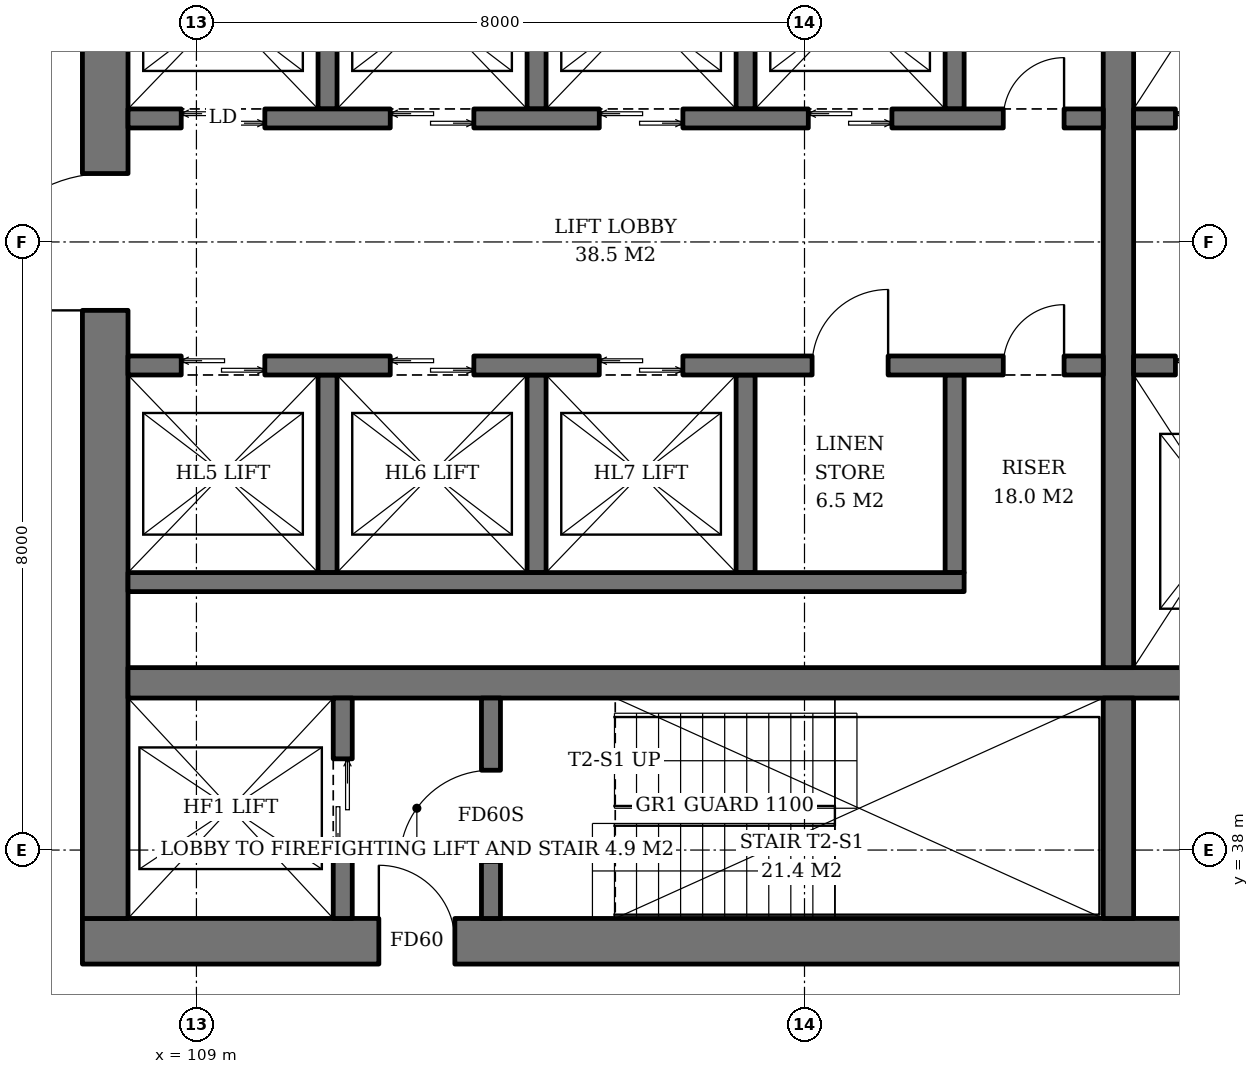
"""IFC4 building model, lengths in metres.
Left out: names, types, materials, properties, quantities, classifications, styles, units other than length and angle.
Written with IfcOpenShell. Run it as: python <this file> out.ifc"""

import sys

from ifc_helpers import new_model, si_unit, direction, frame, frame_2d, origin, place, context, subcontext, project, spatial, rectangle, extrude, element, fill, save


model = new_model("IFC4")
c1 = context("Model", 3, precision=1e-05, world=origin(), true_north=direction((0.0, 1.0)))
c2 = subcontext(c1, "Body", "Model", "MODEL_VIEW")
j1 = project(units=[si_unit("LENGTHUNIT", "METRE"), si_unit("PLANEANGLEUNIT", "RADIAN")], contexts=[c1])
p1 = place(None, origin())
s1 = spatial("IfcSite", under=j1, at=p1, CompositionType="ELEMENT")
p2 = place(p1, origin())
s2 = spatial("IfcBuilding", under=s1, at=p2, CompositionType="ELEMENT")
p3 = place(p2, frame((0.0, 0.0, 24.8)))
s3 = spatial("IfcBuildingStorey", under=s2, at=p3, CompositionType="ELEMENT", Elevation=24.8)
p4 = place(p3, frame((107.5, 36.8, 0.0), z_axis=(0.0, 0.0, 1.0), x_axis=(1.0, 0.0, 0.0)))
e1 = element("IfcWall", 1, at=p4, inside=s3, PredefinedType="SHEAR", context=c2, shape_type="SweptSolid", body=[
    extrude(rectangle(XDim=19.0, YDim=0.6, at=frame_2d((9.5, 0.0))), origin(), (0.0, 0.0, 1.0), 3.8),
])
p5 = place(p4, frame((3.9, 0.0, 0.0)))
e2 = element("IfcOpeningElement", 2, at=p5, cuts=e1, PredefinedType="OPENING", context=c2, shape_type="SweptSolid", body=[
    extrude(rectangle(XDim=1.0, YDim=2.1, at=frame_2d((0.5, 1.05))), frame((0.0, 0.31, 0.0), z_axis=(0.0, -1.0, 0.0), x_axis=(1.0, 0.0, 0.0)), (0.0, 0.0, 1.0), 0.62),
])
p6 = place(p4, frame((15.615, 0.0, 0.0)))
e3 = element("IfcOpeningElement", 3, at=p6, cuts=e1, PredefinedType="OPENING", context=c2, shape_type="SweptSolid", body=[
    extrude(rectangle(XDim=1.0, YDim=2.1, at=frame_2d((0.5, 1.05))), frame((0.0, 0.31, 0.0), z_axis=(0.0, -1.0, 0.0), x_axis=(1.0, 0.0, 0.0)), (0.0, 0.0, 1.0), 0.62),
])
p7 = place(p3, frame((107.8, 37.1, 0.0), z_axis=(0.0, 0.0, 1.0), x_axis=(0.0, 1.0, 0.0)))
e4 = element("IfcWall", 4, at=p7, inside=s3, PredefinedType="SHEAR", context=c2, shape_type="SweptSolid", body=[
    extrude(rectangle(XDim=17.8, YDim=0.6, at=frame_2d((8.9, 0.0))), origin(), (0.0, 0.0, 1.0), 3.8),
])
p8 = place(p7, frame((8.0, 0.0, 0.0)))
e5 = element("IfcOpeningElement", 5, at=p8, cuts=e4, PredefinedType="OPENING", context=c2, shape_type="SweptSolid", body=[
    extrude(rectangle(XDim=1.8, YDim=2.4, at=frame_2d((0.9, 1.2))), frame((0.0, 0.31, 0.0), z_axis=(0.0, -1.0, 0.0), x_axis=(1.0, 0.0, 0.0)), (0.0, 0.0, 1.0), 0.62),
])
p9 = place(p3, frame((108.1, 40.2, 0.0), z_axis=(0.0, 0.0, 1.0), x_axis=(1.0, 0.0, 0.0)))
e6 = element("IfcWall", 6, at=p9, inside=s3, PredefinedType="SHEAR", context=c2, shape_type="SweptSolid", body=[
    extrude(rectangle(XDim=17.8, YDim=0.4, at=frame_2d((8.9, 0.0))), origin(), (0.0, 0.0, 1.0), 3.8),
])
p10 = place(p3, frame((121.13, 37.1, 0.0), z_axis=(0.0, 0.0, 1.0), x_axis=(0.0, 1.0, 0.0)))
e7 = element("IfcWall", 7, at=p10, inside=s3, PredefinedType="SHEAR", context=c2, shape_type="SweptSolid", body=[
    extrude(rectangle(XDim=2.9, YDim=0.4, at=frame_2d((1.45, 0.0))), origin(), (0.0, 0.0, 1.0), 3.8),
])
p11 = place(p3, frame((121.13, 40.4, 0.0), z_axis=(0.0, 0.0, 1.0), x_axis=(0.0, 1.0, 0.0)))
e8 = element("IfcWall", 8, at=p11, inside=s3, PredefinedType="SHEAR", context=c2, shape_type="SweptSolid", body=[
    extrude(rectangle(XDim=11.2, YDim=0.4, at=frame_2d((5.6, 0.0))), origin(), (0.0, 0.0, 1.0), 3.8),
])
p12 = place(p3, frame((110.925, 37.1, 0.0), z_axis=(0.0, 0.0, 1.0), x_axis=(0.0, 1.0, 0.0)))
e9 = element("IfcWall", 9, at=p12, inside=s3, PredefinedType="SHEAR", context=c2, shape_type="SweptSolid", body=[
    extrude(rectangle(XDim=2.9, YDim=0.25, at=frame_2d((1.45, 0.0))), origin(), (0.0, 0.0, 1.0), 3.8),
])
p13 = place(p12, frame((0.8, 0.0, 0.0)))
e10 = element("IfcOpeningElement", 10, at=p13, cuts=e9, PredefinedType="OPENING", context=c2, shape_type="SweptSolid", body=[
    extrude(rectangle(XDim=1.3, YDim=2.2, at=frame_2d((0.65, 1.1))), frame((0.0, 0.135, 0.0), z_axis=(0.0, -1.0, 0.0), x_axis=(1.0, 0.0, 0.0)), (0.0, 0.0, 1.0), 0.27),
])
p14 = place(p3, frame((112.875, 37.1, 0.0), z_axis=(0.0, 0.0, 1.0), x_axis=(0.0, 1.0, 0.0)))
e11 = element("IfcWall", 11, at=p14, inside=s3, PredefinedType="SHEAR", context=c2, shape_type="SweptSolid", body=[
    extrude(rectangle(XDim=2.9, YDim=0.25, at=frame_2d((1.45, 0.0))), origin(), (0.0, 0.0, 1.0), 3.8),
])
p15 = place(p14, frame((0.75, 0.0, 0.0)))
e12 = element("IfcOpeningElement", 12, at=p15, cuts=e11, PredefinedType="OPENING", context=c2, shape_type="SweptSolid", body=[
    extrude(rectangle(XDim=1.2, YDim=2.1, at=frame_2d((0.6, 1.05))), frame((0.0, 0.135, 0.0), z_axis=(0.0, -1.0, 0.0), x_axis=(1.0, 0.0, 0.0)), (0.0, 0.0, 1.0), 0.27),
])
for number, where, z_axis, x_axis in (
    (13, (110.725, 47.75, 0.0), (0.0, 0.0, 1.0), (0.0, 1.0, 0.0)),
    (14, (113.475, 47.75, 0.0), (0.0, 0.0, 1.0), (0.0, 1.0, 0.0)),
    (15, (116.225, 47.75, 0.0), (0.0, 0.0, 1.0), (0.0, 1.0, 0.0)),
    (16, (118.975, 47.75, 0.0), (0.0, 0.0, 1.0), (0.0, 1.0, 0.0)),
):
    element("IfcWall", number, at=place(p3, frame(where, z_axis=z_axis, x_axis=x_axis)), inside=s3, PredefinedType="SHEAR", context=c2, shape_type="SweptSolid", body=[
        extrude(rectangle(XDim=2.6, YDim=0.25, at=frame_2d((1.3, 0.0))), origin(), (0.0, 0.0, 1.0), 3.8),
    ])
p16 = place(p3, frame((108.1, 47.625, 0.0), z_axis=(0.0, 0.0, 1.0), x_axis=(1.0, 0.0, 0.0)))
e17 = element("IfcWall", 17, at=p16, inside=s3, PredefinedType="SHEAR", context=c2, shape_type="SweptSolid", body=[
    extrude(rectangle(XDim=12.83, YDim=0.25, at=frame_2d((6.415, 0.0))), origin(), (0.0, 0.0, 1.0), 3.8),
])
p17 = place(p16, frame((0.7, 0.0, 0.0)))
e18 = element("IfcOpeningElement", 18, at=p17, cuts=e17, PredefinedType="OPENING", context=c2, shape_type="SweptSolid", body=[
    extrude(rectangle(XDim=1.1, YDim=2.2, at=frame_2d((0.55, 1.1))), frame((0.0, 0.135, 0.0), z_axis=(0.0, -1.0, 0.0), x_axis=(1.0, 0.0, 0.0)), (0.0, 0.0, 1.0), 0.27),
])
p18 = place(p16, frame((3.45, 0.0, 0.0)))
e19 = element("IfcOpeningElement", 19, at=p18, cuts=e17, PredefinedType="OPENING", context=c2, shape_type="SweptSolid", body=[
    extrude(rectangle(XDim=1.1, YDim=2.2, at=frame_2d((0.55, 1.1))), frame((0.0, 0.135, 0.0), z_axis=(0.0, -1.0, 0.0), x_axis=(1.0, 0.0, 0.0)), (0.0, 0.0, 1.0), 0.27),
])
p19 = place(p16, frame((6.2, 0.0, 0.0)))
e20 = element("IfcOpeningElement", 20, at=p19, cuts=e17, PredefinedType="OPENING", context=c2, shape_type="SweptSolid", body=[
    extrude(rectangle(XDim=1.1, YDim=2.2, at=frame_2d((0.55, 1.1))), frame((0.0, 0.135, 0.0), z_axis=(0.0, -1.0, 0.0), x_axis=(1.0, 0.0, 0.0)), (0.0, 0.0, 1.0), 0.27),
])
p20 = place(p16, frame((8.95, 0.0, 0.0)))
e21 = element("IfcOpeningElement", 21, at=p20, cuts=e17, PredefinedType="OPENING", context=c2, shape_type="SweptSolid", body=[
    extrude(rectangle(XDim=1.1, YDim=2.2, at=frame_2d((0.55, 1.1))), frame((0.0, 0.135, 0.0), z_axis=(0.0, -1.0, 0.0), x_axis=(1.0, 0.0, 0.0)), (0.0, 0.0, 1.0), 0.27),
])
p21 = place(p16, frame((11.515, 0.0, 0.0)))
e22 = element("IfcOpeningElement", 22, at=p21, cuts=e17, PredefinedType="OPENING", context=c2, shape_type="SweptSolid", body=[
    extrude(rectangle(XDim=0.8, YDim=2.0, at=frame_2d((0.4, 1.0))), frame((0.0, 0.135, 0.0), z_axis=(0.0, -1.0, 0.0), x_axis=(1.0, 0.0, 0.0)), (0.0, 0.0, 1.0), 0.27),
])
for number, where, z_axis, x_axis in (
    (23, (110.725, 44.25, 0.0), (0.0, 0.0, 1.0), (0.0, -1.0, 0.0)),
    (24, (113.475, 44.25, 0.0), (0.0, 0.0, 1.0), (0.0, -1.0, 0.0)),
    (25, (116.225, 44.25, 0.0), (0.0, 0.0, 1.0), (0.0, -1.0, 0.0)),
    (26, (118.975, 44.25, 0.0), (0.0, 0.0, 1.0), (0.0, -1.0, 0.0)),
):
    element("IfcWall", number, at=place(p3, frame(where, z_axis=z_axis, x_axis=x_axis)), inside=s3, PredefinedType="SHEAR", context=c2, shape_type="SweptSolid", body=[
        extrude(rectangle(XDim=2.6, YDim=0.25, at=frame_2d((1.3, 0.0))), origin(), (0.0, 0.0, 1.0), 3.8),
    ])
p22 = place(p3, frame((108.1, 41.525, 0.0), z_axis=(0.0, 0.0, 1.0), x_axis=(1.0, 0.0, 0.0)))
e27 = element("IfcWall", 27, at=p22, inside=s3, PredefinedType="SHEAR", context=c2, shape_type="SweptSolid", body=[
    extrude(rectangle(XDim=11.0, YDim=0.25, at=frame_2d((5.5, 0.0))), origin(), (0.0, 0.0, 1.0), 3.8),
])
p23 = place(p3, frame((108.1, 44.375, 0.0), z_axis=(0.0, 0.0, 1.0), x_axis=(1.0, 0.0, 0.0)))
e28 = element("IfcWall", 28, at=p23, inside=s3, PredefinedType="SHEAR", context=c2, shape_type="SweptSolid", body=[
    extrude(rectangle(XDim=12.83, YDim=0.25, at=frame_2d((6.415, 0.0))), origin(), (0.0, 0.0, 1.0), 3.8),
])
p24 = place(p23, frame((0.7, 0.0, 0.0)))
e29 = element("IfcOpeningElement", 29, at=p24, cuts=e28, PredefinedType="OPENING", context=c2, shape_type="SweptSolid", body=[
    extrude(rectangle(XDim=1.1, YDim=2.2, at=frame_2d((0.55, 1.1))), frame((0.0, 0.135, 0.0), z_axis=(0.0, -1.0, 0.0), x_axis=(1.0, 0.0, 0.0)), (0.0, 0.0, 1.0), 0.27),
])
p25 = place(p23, frame((3.45, 0.0, 0.0)))
e30 = element("IfcOpeningElement", 30, at=p25, cuts=e28, PredefinedType="OPENING", context=c2, shape_type="SweptSolid", body=[
    extrude(rectangle(XDim=1.1, YDim=2.2, at=frame_2d((0.55, 1.1))), frame((0.0, 0.135, 0.0), z_axis=(0.0, -1.0, 0.0), x_axis=(1.0, 0.0, 0.0)), (0.0, 0.0, 1.0), 0.27),
])
p26 = place(p23, frame((6.2, 0.0, 0.0)))
e31 = element("IfcOpeningElement", 31, at=p26, cuts=e28, PredefinedType="OPENING", context=c2, shape_type="SweptSolid", body=[
    extrude(rectangle(XDim=1.1, YDim=2.2, at=frame_2d((0.55, 1.1))), frame((0.0, 0.135, 0.0), z_axis=(0.0, -1.0, 0.0), x_axis=(1.0, 0.0, 0.0)), (0.0, 0.0, 1.0), 0.27),
])
p27 = place(p23, frame((9.0, 0.0, 0.0)))
e32 = element("IfcOpeningElement", 32, at=p27, cuts=e28, PredefinedType="OPENING", context=c2, shape_type="SweptSolid", body=[
    extrude(rectangle(XDim=1.0, YDim=2.1, at=frame_2d((0.5, 1.05))), frame((0.0, 0.135, 0.0), z_axis=(0.0, -1.0, 0.0), x_axis=(1.0, 0.0, 0.0)), (0.0, 0.0, 1.0), 0.27),
])
p28 = place(p23, frame((11.515, 0.0, 0.0)))
e33 = element("IfcOpeningElement", 33, at=p28, cuts=e28, PredefinedType="OPENING", context=c2, shape_type="SweptSolid", body=[
    extrude(rectangle(XDim=0.8, YDim=2.0, at=frame_2d((0.4, 1.0))), frame((0.0, 0.135, 0.0), z_axis=(0.0, -1.0, 0.0), x_axis=(1.0, 0.0, 0.0)), (0.0, 0.0, 1.0), 0.27),
])
p29 = place(p3, frame((121.33, 47.625, 0.0), z_axis=(0.0, 0.0, 1.0), x_axis=(1.0, 0.0, 0.0)))
e34 = element("IfcWall", 34, at=p29, inside=s3, PredefinedType="SHEAR", context=c2, shape_type="SweptSolid", body=[
    extrude(rectangle(XDim=4.57, YDim=0.25, at=frame_2d((2.285, 0.0))), origin(), (0.0, 0.0, 1.0), 3.8),
])
p30 = place(p29, frame((0.55, 0.0, 0.0)))
e35 = element("IfcOpeningElement", 35, at=p30, cuts=e34, PredefinedType="OPENING", context=c2, shape_type="SweptSolid", body=[
    extrude(rectangle(XDim=1.4, YDim=2.4, at=frame_2d((0.7, 1.2))), frame((0.0, 0.135, 0.0), z_axis=(0.0, -1.0, 0.0), x_axis=(1.0, 0.0, 0.0)), (0.0, 0.0, 1.0), 0.27),
])
p31 = place(p29, frame((3.26, 0.0, 0.0)))
e36 = element("IfcOpeningElement", 36, at=p31, cuts=e34, PredefinedType="OPENING", context=c2, shape_type="SweptSolid", body=[
    extrude(rectangle(XDim=0.8, YDim=2.0, at=frame_2d((0.4, 1.0))), frame((0.0, 0.135, 0.0), z_axis=(0.0, -1.0, 0.0), x_axis=(1.0, 0.0, 0.0)), (0.0, 0.0, 1.0), 0.27),
])
p32 = place(p3, frame((121.33, 44.375, 0.0), z_axis=(0.0, 0.0, 1.0), x_axis=(1.0, 0.0, 0.0)))
e37 = element("IfcWall", 37, at=p32, inside=s3, PredefinedType="SHEAR", context=c2, shape_type="SweptSolid", body=[
    extrude(rectangle(XDim=4.57, YDim=0.25, at=frame_2d((2.285, 0.0))), origin(), (0.0, 0.0, 1.0), 3.8),
])
p33 = place(p32, frame((0.55, 0.0, 0.0)))
e38 = element("IfcOpeningElement", 38, at=p33, cuts=e37, PredefinedType="OPENING", context=c2, shape_type="SweptSolid", body=[
    extrude(rectangle(XDim=1.4, YDim=2.4, at=frame_2d((0.7, 1.2))), frame((0.0, 0.135, 0.0), z_axis=(0.0, -1.0, 0.0), x_axis=(1.0, 0.0, 0.0)), (0.0, 0.0, 1.0), 0.27),
])
p34 = place(p32, frame((3.26, 0.0, 0.0)))
e39 = element("IfcOpeningElement", 39, at=p34, cuts=e37, PredefinedType="OPENING", context=c2, shape_type="SweptSolid", body=[
    extrude(rectangle(XDim=0.8, YDim=2.0, at=frame_2d((0.4, 1.0))), frame((0.0, 0.135, 0.0), z_axis=(0.0, -1.0, 0.0), x_axis=(1.0, 0.0, 0.0)), (0.0, 0.0, 1.0), 0.27),
])
p35 = place(p13, origin())
e40 = element("IfcDoor", 40, at=p35, inside=s3, OperationType="DOUBLE_DOOR_SLIDING", PredefinedType="DOOR", context=c2, shape_type="SweptSolid", body=[
    extrude(rectangle(XDim=1.3, YDim=2.2, at=frame_2d((0.65, 1.1))), frame((0.0, 0.025, 0.0), z_axis=(0.0, -1.0, 0.0), x_axis=(1.0, 0.0, 0.0)), (0.0, 0.0, 1.0), 0.05),
])
fill(e10, e40)
p36 = place(p15, origin())
e41 = element("IfcDoor", 41, at=p36, inside=s3, OperationType="SINGLE_SWING_LEFT", PredefinedType="DOOR", context=c2, shape_type="SweptSolid", body=[
    extrude(rectangle(XDim=1.2, YDim=2.1, at=frame_2d((0.6, 1.05))), frame((0.0, 0.025, 0.0), z_axis=(0.0, -1.0, 0.0), x_axis=(1.0, 0.0, 0.0)), (0.0, 0.0, 1.0), 0.05),
])
fill(e12, e41)
p37 = place(p17, origin())
e42 = element("IfcDoor", 42, at=p37, inside=s3, OperationType="DOUBLE_DOOR_SLIDING", PredefinedType="DOOR", context=c2, shape_type="SweptSolid", body=[
    extrude(rectangle(XDim=1.1, YDim=2.2, at=frame_2d((0.55, 1.1))), frame((0.0, 0.025, 0.0), z_axis=(0.0, -1.0, 0.0), x_axis=(1.0, 0.0, 0.0)), (0.0, 0.0, 1.0), 0.05),
])
fill(e18, e42)
p38 = place(p18, origin())
e43 = element("IfcDoor", 43, at=p38, inside=s3, OperationType="DOUBLE_DOOR_SLIDING", PredefinedType="DOOR", context=c2, shape_type="SweptSolid", body=[
    extrude(rectangle(XDim=1.1, YDim=2.2, at=frame_2d((0.55, 1.1))), frame((0.0, 0.025, 0.0), z_axis=(0.0, -1.0, 0.0), x_axis=(1.0, 0.0, 0.0)), (0.0, 0.0, 1.0), 0.05),
])
fill(e19, e43)
p39 = place(p19, origin())
e44 = element("IfcDoor", 44, at=p39, inside=s3, OperationType="DOUBLE_DOOR_SLIDING", PredefinedType="DOOR", context=c2, shape_type="SweptSolid", body=[
    extrude(rectangle(XDim=1.1, YDim=2.2, at=frame_2d((0.55, 1.1))), frame((0.0, 0.025, 0.0), z_axis=(0.0, -1.0, 0.0), x_axis=(1.0, 0.0, 0.0)), (0.0, 0.0, 1.0), 0.05),
])
fill(e20, e44)
p40 = place(p20, origin())
e45 = element("IfcDoor", 45, at=p40, inside=s3, OperationType="DOUBLE_DOOR_SLIDING", PredefinedType="DOOR", context=c2, shape_type="SweptSolid", body=[
    extrude(rectangle(XDim=1.1, YDim=2.2, at=frame_2d((0.55, 1.1))), frame((0.0, 0.025, 0.0), z_axis=(0.0, -1.0, 0.0), x_axis=(1.0, 0.0, 0.0)), (0.0, 0.0, 1.0), 0.05),
])
fill(e21, e45)
p41 = place(p21, origin())
e46 = element("IfcDoor", 46, at=p41, inside=s3, OperationType="SINGLE_SWING_RIGHT", PredefinedType="DOOR", context=c2, shape_type="SweptSolid", body=[
    extrude(rectangle(XDim=0.8, YDim=2.0, at=frame_2d((0.4, 1.0))), frame((0.0, 0.025, 0.0), z_axis=(0.0, -1.0, 0.0), x_axis=(1.0, 0.0, 0.0)), (0.0, 0.0, 1.0), 0.05),
])
fill(e22, e46)
p42 = place(p24, origin())
e47 = element("IfcDoor", 47, at=p42, inside=s3, OperationType="DOUBLE_DOOR_SLIDING", PredefinedType="DOOR", context=c2, shape_type="SweptSolid", body=[
    extrude(rectangle(XDim=1.1, YDim=2.2, at=frame_2d((0.55, 1.1))), frame((0.0, 0.025, 0.0), z_axis=(0.0, -1.0, 0.0), x_axis=(1.0, 0.0, 0.0)), (0.0, 0.0, 1.0), 0.05),
])
fill(e29, e47)
p43 = place(p25, origin())
e48 = element("IfcDoor", 48, at=p43, inside=s3, OperationType="DOUBLE_DOOR_SLIDING", PredefinedType="DOOR", context=c2, shape_type="SweptSolid", body=[
    extrude(rectangle(XDim=1.1, YDim=2.2, at=frame_2d((0.55, 1.1))), frame((0.0, 0.025, 0.0), z_axis=(0.0, -1.0, 0.0), x_axis=(1.0, 0.0, 0.0)), (0.0, 0.0, 1.0), 0.05),
])
fill(e30, e48)
p44 = place(p26, origin())
e49 = element("IfcDoor", 49, at=p44, inside=s3, OperationType="DOUBLE_DOOR_SLIDING", PredefinedType="DOOR", context=c2, shape_type="SweptSolid", body=[
    extrude(rectangle(XDim=1.1, YDim=2.2, at=frame_2d((0.55, 1.1))), frame((0.0, 0.025, 0.0), z_axis=(0.0, -1.0, 0.0), x_axis=(1.0, 0.0, 0.0)), (0.0, 0.0, 1.0), 0.05),
])
fill(e31, e49)
p45 = place(p27, origin())
e50 = element("IfcDoor", 50, at=p45, inside=s3, OperationType="SINGLE_SWING_RIGHT", PredefinedType="DOOR", context=c2, shape_type="SweptSolid", body=[
    extrude(rectangle(XDim=1.0, YDim=2.1, at=frame_2d((0.5, 1.05))), frame((0.0, 0.025, 0.0), z_axis=(0.0, -1.0, 0.0), x_axis=(1.0, 0.0, 0.0)), (0.0, 0.0, 1.0), 0.05),
])
fill(e32, e50)
p46 = place(p28, origin())
e51 = element("IfcDoor", 51, at=p46, inside=s3, OperationType="SINGLE_SWING_RIGHT", PredefinedType="DOOR", context=c2, shape_type="SweptSolid", body=[
    extrude(rectangle(XDim=0.8, YDim=2.0, at=frame_2d((0.4, 1.0))), frame((0.0, 0.025, 0.0), z_axis=(0.0, -1.0, 0.0), x_axis=(1.0, 0.0, 0.0)), (0.0, 0.0, 1.0), 0.05),
])
fill(e33, e51)
p47 = place(p30, origin())
e52 = element("IfcDoor", 52, at=p47, inside=s3, OperationType="DOUBLE_DOOR_SLIDING", PredefinedType="DOOR", context=c2, shape_type="SweptSolid", body=[
    extrude(rectangle(XDim=1.4, YDim=2.4, at=frame_2d((0.7, 1.2))), frame((0.0, 0.025, 0.0), z_axis=(0.0, -1.0, 0.0), x_axis=(1.0, 0.0, 0.0)), (0.0, 0.0, 1.0), 0.05),
])
fill(e35, e52)
p48 = place(p33, origin())
e53 = element("IfcDoor", 53, at=p48, inside=s3, OperationType="DOUBLE_DOOR_SLIDING", PredefinedType="DOOR", context=c2, shape_type="SweptSolid", body=[
    extrude(rectangle(XDim=1.4, YDim=2.4, at=frame_2d((0.7, 1.2))), frame((0.0, 0.025, 0.0), z_axis=(0.0, -1.0, 0.0), x_axis=(1.0, 0.0, 0.0)), (0.0, 0.0, 1.0), 0.05),
])
fill(e38, e53)
p49 = place(p5, origin())
e54 = element("IfcDoor", 54, at=p49, inside=s3, OperationType="SINGLE_SWING_LEFT", PredefinedType="DOOR", context=c2, shape_type="SweptSolid", body=[
    extrude(rectangle(XDim=1.0, YDim=2.1, at=frame_2d((0.5, 1.05))), frame((0.0, 0.025, 0.0), z_axis=(0.0, -1.0, 0.0), x_axis=(1.0, 0.0, 0.0)), (0.0, 0.0, 1.0), 0.05),
])
fill(e2, e54)
p50 = place(p8, origin())
e55 = element("IfcDoor", 55, at=p50, inside=s3, OperationType="DOUBLE_DOOR_SINGLE_SWING", PredefinedType="DOOR", context=c2, shape_type="SweptSolid", body=[
    extrude(rectangle(XDim=1.8, YDim=2.4, at=frame_2d((0.9, 1.2))), frame((0.0, 0.025, 0.0), z_axis=(0.0, -1.0, 0.0), x_axis=(1.0, 0.0, 0.0)), (0.0, 0.0, 1.0), 0.05),
])
fill(e5, e55)
save(model, sys.argv[1])
